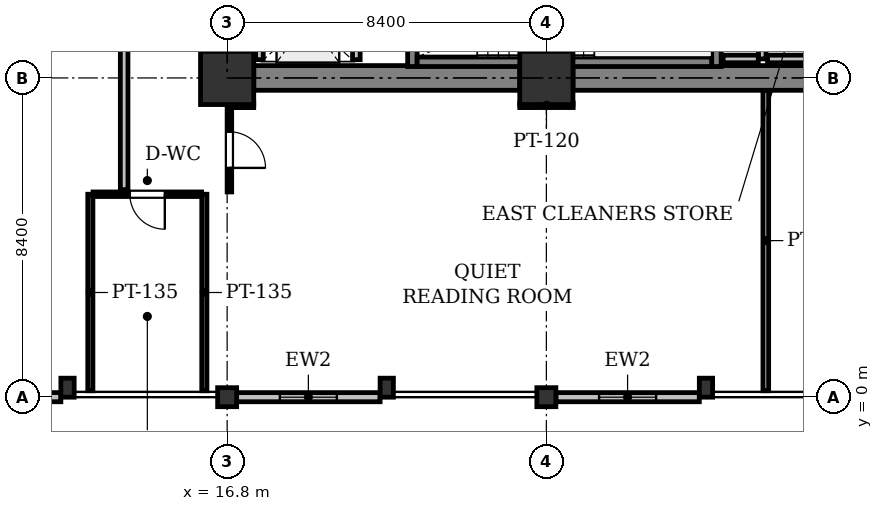
"""IFC4 building model, lengths in metres.
Left out: names, types, materials, properties, quantities, classifications, styles, units other than length and angle.
Written with IfcOpenShell. Run it as: python <this file> out.ifc"""

import sys

from ifc_helpers import new_model, si_unit, direction, frame, frame_2d, origin, origin_2d, place, context, subcontext, project, spatial, rectangle, i_section, extrude, element, fill, save


model = new_model("IFC4")
c1 = context("Model", 3, precision=1e-05, world=origin(), true_north=direction((0.0, 1.0)))
c2 = subcontext(c1, "Body", "Model", "MODEL_VIEW")
j1 = project(units=[si_unit("LENGTHUNIT", "METRE"), si_unit("PLANEANGLEUNIT", "RADIAN")], contexts=[c1])
p1 = place(None, origin())
s1 = spatial("IfcSite", under=j1, at=p1, CompositionType="ELEMENT")
p2 = place(p1, origin())
s2 = spatial("IfcBuilding", under=s1, at=p2, CompositionType="ELEMENT")
p3 = place(p2, frame((0.0, 0.0, 50.0)))
s3 = spatial("IfcBuildingStorey", under=s2, at=p3, CompositionType="ELEMENT", Elevation=50.0)
p4 = place(p3, frame((16.8, 0.0, 0.0), z_axis=(0.0, 0.0, 1.0), x_axis=(1.0, 0.0, 0.0)))
e1 = element("IfcColumn", 1, at=p4, inside=s3, PredefinedType="COLUMN", context=c2, shape_type="SweptSolid", body=[
    extrude(i_section(OverallWidth=0.5, OverallDepth=0.5, WebThickness=0.028, FlangeThickness=0.04, at=origin_2d()), origin(), (0.0, 0.0, 1.0), 4.2),
])
p5 = place(p3, frame((16.8, 8.4, 0.0), z_axis=(0.0, 0.0, 1.0), x_axis=(1.0, 0.0, 0.0)))
e2 = element("IfcColumn", 2, at=p5, inside=s3, PredefinedType="COLUMN", context=c2, shape_type="SweptSolid", body=[
    extrude(rectangle(XDim=1.4, YDim=1.4, at=origin_2d()), origin(), (0.0, 0.0, 1.0), 4.2),
])
p6 = place(p3, frame((25.2, 0.0, 0.0), z_axis=(0.0, 0.0, 1.0), x_axis=(1.0, 0.0, 0.0)))
e3 = element("IfcColumn", 3, at=p6, inside=s3, PredefinedType="COLUMN", context=c2, shape_type="SweptSolid", body=[
    extrude(i_section(OverallWidth=0.5, OverallDepth=0.5, WebThickness=0.028, FlangeThickness=0.04, at=origin_2d()), origin(), (0.0, 0.0, 1.0), 4.2),
])
p7 = place(p3, frame((25.2, 8.4, 0.0), z_axis=(0.0, 0.0, 1.0), x_axis=(1.0, 0.0, 0.0)))
e4 = element("IfcColumn", 4, at=p7, inside=s3, PredefinedType="COLUMN", context=c2, shape_type="SweptSolid", body=[
    extrude(rectangle(XDim=1.4, YDim=1.4, at=origin_2d()), origin(), (0.0, 0.0, 1.0), 4.2),
])
for number, where, z_axis, x_axis in (
    (5, (12.6, 0.25, 0.0), (0.0, 0.0, 1.0), (1.0, 0.0, 0.0)),
    (6, (21.0, 0.25, 0.0), (0.0, 0.0, 1.0), (1.0, 0.0, 0.0)),
    (7, (29.4, 0.25, 0.0), (0.0, 0.0, 1.0), (1.0, 0.0, 0.0)),
):
    element("IfcColumn", number, at=place(p3, frame(where, z_axis=z_axis, x_axis=x_axis)), inside=s3, PredefinedType="PILASTER", context=c2, shape_type="SweptSolid", body=[
        extrude(rectangle(XDim=0.35, YDim=0.5, at=origin_2d()), origin(), (0.0, 0.0, 1.0), 4.2),
    ])
p8 = place(p3, frame((29.225, 0.0, 0.0), z_axis=(0.0, 0.0, 1.0), x_axis=(-1.0, 0.0, 0.0)))
e8 = element("IfcWall", 8, at=p8, inside=s3, PredefinedType="STANDARD", context=c2, shape_type="SweptSolid", body=[
    extrude(rectangle(XDim=3.775, YDim=0.24, at=frame_2d((1.888, 0.0))), origin(), (0.0, 0.0, 1.0), 3.471),
])
p9 = place(p8, frame((1.137, 0.0, 0.9)))
e9 = element("IfcOpeningElement", 9, at=p9, cuts=e8, PredefinedType="OPENING", context=c2, shape_type="SweptSolid", body=[
    extrude(rectangle(XDim=1.5, YDim=1.6, at=frame_2d((0.75, 0.8))), frame((0.0, 0.13, 0.0), z_axis=(0.0, -1.0, 0.0), x_axis=(1.0, 0.0, 0.0)), (0.0, 0.0, 1.0), 0.26),
])
p10 = place(p3, frame((20.825, 0.0, 0.0), z_axis=(0.0, 0.0, 1.0), x_axis=(-1.0, 0.0, 0.0)))
e10 = element("IfcWall", 10, at=p10, inside=s3, PredefinedType="STANDARD", context=c2, shape_type="SweptSolid", body=[
    extrude(rectangle(XDim=3.775, YDim=0.24, at=frame_2d((1.887, 0.0))), origin(), (0.0, 0.0, 1.0), 3.471),
])
p11 = place(p10, frame((1.137, 0.0, 0.9)))
e11 = element("IfcOpeningElement", 11, at=p11, cuts=e10, PredefinedType="OPENING", context=c2, shape_type="SweptSolid", body=[
    extrude(rectangle(XDim=1.5, YDim=1.6, at=frame_2d((0.75, 0.8))), frame((0.0, 0.13, 0.0), z_axis=(0.0, -1.0, 0.0), x_axis=(1.0, 0.0, 0.0)), (0.0, 0.0, 1.0), 0.26),
])
p12 = place(p3, frame((12.425, 0.0, 0.0), z_axis=(0.0, 0.0, 1.0), x_axis=(-1.0, 0.0, 0.0)))
e12 = element("IfcWall", 12, at=p12, inside=s3, PredefinedType="STANDARD", context=c2, shape_type="SweptSolid", body=[
    extrude(rectangle(XDim=3.775, YDim=0.24, at=frame_2d((1.888, 0.0))), origin(), (0.0, 0.0, 1.0), 3.471),
])
p13 = place(p12, frame((1.137, 0.0, 0.9)))
e13 = element("IfcOpeningElement", 13, at=p13, cuts=e12, PredefinedType="OPENING", context=c2, shape_type="SweptSolid", body=[
    extrude(rectangle(XDim=1.5, YDim=1.6, at=frame_2d((0.75, 0.8))), frame((0.0, 0.13, 0.0), z_axis=(0.0, -1.0, 0.0), x_axis=(1.0, 0.0, 0.0)), (0.0, 0.0, 1.0), 0.26),
])
for number, where, z_axis, x_axis in (
    (14, (17.5, 8.4, 0.0), (0.0, 0.0, 1.0), (1.0, 0.0, 0.0)),
    (15, (25.9, 8.4, 0.0), (0.0, 0.0, 1.0), (1.0, 0.0, 0.0)),
):
    element("IfcWall", number, at=place(p3, frame(where, z_axis=z_axis, x_axis=x_axis)), inside=s3, PredefinedType="SHEAR", context=c2, shape_type="SweptSolid", body=[
        extrude(rectangle(XDim=7.0, YDim=0.65, at=frame_2d((3.5, 0.0))), origin(), (0.0, 0.0, 1.0), 3.925),
    ])
for number, where, z_axis, x_axis in (
    (16, (21.675, 8.7, 0.0), (0.0, 0.0, 1.0), (0.0, 1.0, 0.0)),
    (17, (29.675, 8.7, 0.0), (0.0, 0.0, 1.0), (0.0, 1.0, 0.0)),
):
    element("IfcWall", number, at=place(p3, frame(where, z_axis=z_axis, x_axis=x_axis)), inside=s3, PredefinedType="SHEAR", context=c2, shape_type="SweptSolid", body=[
        extrude(rectangle(XDim=3.75, YDim=0.25, at=frame_2d((1.875, 0.0))), origin(), (0.0, 0.0, 1.0), 3.925),
    ])
p14 = place(p3, frame((21.8, 8.825, 0.0), z_axis=(0.0, 0.0, 1.0), x_axis=(1.0, 0.0, 0.0)))
e18 = element("IfcWall", 18, at=p14, inside=s3, PredefinedType="SHEAR", context=c2, shape_type="SweptSolid", body=[
    extrude(rectangle(XDim=7.75, YDim=0.25, at=frame_2d((3.875, 0.0))), origin(), (0.0, 0.0, 1.0), 3.925),
])
for number, where, z_axis, x_axis in (
    (19, (20.2, 8.88, 0.0), (0.0, 0.0, 1.0), (0.0, 1.0, 0.0)),
    (20, (17.65, 8.88, 0.0), (0.0, 0.0, 1.0), (0.0, 1.0, 0.0)),
):
    element("IfcWall", number, at=place(p3, frame(where, z_axis=z_axis, x_axis=x_axis)), inside=s3, PredefinedType="PARTITIONING", context=c2, shape_type="SweptSolid", body=[
        extrude(rectangle(XDim=2.1, YDim=0.2, at=frame_2d((1.05, 0.0))), origin(), (0.0, 0.0, 1.0), 3.925),
    ])
p15 = place(p3, frame((30.88, 8.9, 0.0), z_axis=(0.0, 0.0, 1.0), x_axis=(0.0, 1.0, 0.0)))
e21 = element("IfcWall", 21, at=p15, inside=s3, PredefinedType="PARTITIONING", context=c2, shape_type="SweptSolid", body=[
    extrude(rectangle(XDim=3.43, YDim=0.2, at=frame_2d((1.715, 0.0))), origin(), (0.0, 0.0, 1.0), 3.925),
])
p16 = place(p15, frame((1.29, 0.0, 0.0)))
e22 = element("IfcOpeningElement", 22, at=p16, cuts=e21, PredefinedType="OPENING", context=c2, shape_type="SweptSolid", body=[
    extrude(rectangle(XDim=0.85, YDim=2.15, at=frame_2d((0.425, 1.075))), frame((0.0, 0.11, 0.0), z_axis=(0.0, -1.0, 0.0), x_axis=(1.0, 0.0, 0.0)), (0.0, 0.0, 1.0), 0.22),
])
p17 = place(p3, frame((29.85, 8.9, 0.0), z_axis=(0.0, 0.0, 1.0), x_axis=(1.0, 0.0, 0.0)))
e23 = element("IfcWall", 23, at=p17, inside=s3, PredefinedType="PARTITIONING", context=c2, shape_type="SweptSolid", body=[
    extrude(rectangle(XDim=0.926, YDim=0.2, at=frame_2d((0.463, 0.0))), origin(), (0.0, 0.0, 1.0), 3.925),
])
p18 = place(p3, frame((31.02, 8.9, 0.0), z_axis=(0.0, 0.0, 1.0), x_axis=(1.0, 0.0, 0.0)))
e24 = element("IfcWall", 24, at=p18, inside=s3, PredefinedType="PARTITIONING", context=c2, shape_type="SweptSolid", body=[
    extrude(rectangle(XDim=1.126, YDim=0.2, at=frame_2d((0.563, 0.0))), origin(), (0.0, 0.0, 1.0), 3.925),
])
for number, where, z_axis, x_axis in (
    (25, (13.2, 5.34, 0.0), (0.0, 0.0, 1.0), (0.0, -1.0, 0.0)),
    (26, (16.2, 0.169, 0.0), (0.0, 0.0, 1.0), (0.0, 1.0, 0.0)),
):
    element("IfcWall", number, at=place(p3, frame(where, z_axis=z_axis, x_axis=x_axis)), inside=s3, PredefinedType="PARTITIONING", context=c2, shape_type="SweptSolid", body=[
        extrude(rectangle(XDim=5.171, YDim=0.135, at=frame_2d((2.585, 0.0))), origin(), (0.0, 0.0, 1.0), 3.925),
    ])
p19 = place(p3, frame((16.128, 5.34, 0.0), z_axis=(0.0, 0.0, 1.0), x_axis=(-1.0, 0.0, 0.0)))
e27 = element("IfcWall", 27, at=p19, inside=s3, PredefinedType="PARTITIONING", context=c2, shape_type="SweptSolid", body=[
    extrude(rectangle(XDim=2.857, YDim=0.12, at=frame_2d((1.428, 0.0))), origin(), (0.0, 0.0, 1.0), 3.925),
])
p20 = place(p19, frame((0.969, 0.0, 0.0)))
e28 = element("IfcOpeningElement", 28, at=p20, cuts=e27, PredefinedType="OPENING", context=c2, shape_type="SweptSolid", body=[
    extrude(rectangle(XDim=0.92, YDim=2.1, at=frame_2d((0.46, 1.05))), frame((0.0, 0.07, 0.0), z_axis=(0.0, -1.0, 0.0), x_axis=(1.0, 0.0, 0.0)), (0.0, 0.0, 1.0), 0.14),
])
p21 = place(p3, frame((30.975, 0.169, 0.0), z_axis=(0.0, 0.0, 1.0), x_axis=(0.0, 1.0, 0.0)))
e29 = element("IfcWall", 29, at=p21, inside=s3, PredefinedType="PARTITIONING", context=c2, shape_type="SweptSolid", body=[
    extrude(rectangle(XDim=7.902, YDim=0.15, at=frame_2d((3.951, 0.0))), origin(), (0.0, 0.0, 1.0), 3.925),
])
p22 = place(p3, frame((25.906, 7.681, 0.0), z_axis=(0.0, 0.0, 1.0), x_axis=(-0.999999758706, -0.000694685487, 0.0)))
e30 = element("IfcWall", 30, at=p22, inside=s3, PredefinedType="PARTITIONING", context=c2, shape_type="SweptSolid", body=[
    extrude(rectangle(XDim=1.406, YDim=0.12, at=frame_2d((0.703, 0.0))), origin(), (0.0, 0.0, 1.0), 3.323),
])
p23 = place(p3, frame((17.5, 7.68, 0.0), z_axis=(0.0, 0.0, 1.0), x_axis=(-1.0, 0.0, 0.0)))
e31 = element("IfcWall", 31, at=p23, inside=s3, PredefinedType="PARTITIONING", context=c2, shape_type="SweptSolid", body=[
    extrude(rectangle(XDim=0.64, YDim=0.12, at=frame_2d((0.32, 0.0))), origin(), (0.0, 0.0, 1.0), 3.323),
])
p24 = place(p3, frame((16.86, 7.616, 0.0), z_axis=(0.0, 0.0, 1.0), x_axis=(0.0, -1.0, 0.0)))
e32 = element("IfcWall", 32, at=p24, inside=s3, PredefinedType="PARTITIONING", context=c2, shape_type="SweptSolid", body=[
    extrude(rectangle(XDim=2.216, YDim=0.12, at=frame_2d((1.108, 0.0))), origin(), (0.0, 0.0, 1.0), 3.323),
])
p25 = place(p24, frame((0.633, 0.0, 0.0)))
e33 = element("IfcOpeningElement", 33, at=p25, cuts=e32, PredefinedType="OPENING", context=c2, shape_type="SweptSolid", body=[
    extrude(rectangle(XDim=0.95, YDim=2.15, at=frame_2d((0.475, 1.075))), frame((0.0, 0.07, 0.0), z_axis=(0.0, -1.0, 0.0), x_axis=(1.0, 0.0, 0.0)), (0.0, 0.0, 1.0), 0.14),
])
p26 = place(p3, frame((14.09, 5.46, 0.0), z_axis=(0.0, 0.0, 1.0), x_axis=(0.0, 1.0, 0.0)))
e34 = element("IfcWall", 34, at=p26, inside=s3, PredefinedType="PARTITIONING", context=c2, shape_type="SweptSolid", body=[
    extrude(rectangle(XDim=12.08, YDim=0.2, at=frame_2d((6.04, 0.0))), origin(), (0.0, 0.0, 1.0), 3.313),
])
p27 = place(p9, origin())
e35 = element("IfcWindow", 35, at=p27, inside=s3, PartitioningType="SINGLE_PANEL", PredefinedType="WINDOW", context=c2, shape_type="SweptSolid", body=[
    extrude(rectangle(XDim=1.5, YDim=1.6, at=frame_2d((0.75, 0.8))), frame((0.0, 0.03, 0.0), z_axis=(0.0, -1.0, 0.0), x_axis=(1.0, 0.0, 0.0)), (0.0, 0.0, 1.0), 0.06),
])
fill(e9, e35)
p28 = place(p11, origin())
e36 = element("IfcWindow", 36, at=p28, inside=s3, PartitioningType="SINGLE_PANEL", PredefinedType="WINDOW", context=c2, shape_type="SweptSolid", body=[
    extrude(rectangle(XDim=1.5, YDim=1.6, at=frame_2d((0.75, 0.8))), frame((0.0, 0.03, 0.0), z_axis=(0.0, -1.0, 0.0), x_axis=(1.0, 0.0, 0.0)), (0.0, 0.0, 1.0), 0.06),
])
fill(e11, e36)
p29 = place(p20, origin())
e37 = element("IfcDoor", 37, at=p29, inside=s3, OperationType="SINGLE_SWING_LEFT", PredefinedType="DOOR", context=c2, shape_type="SweptSolid", body=[
    extrude(rectangle(XDim=0.92, YDim=2.1, at=frame_2d((0.46, 1.05))), frame((0.0, 0.025, 0.0), z_axis=(0.0, -1.0, 0.0), x_axis=(1.0, 0.0, 0.0)), (0.0, 0.0, 1.0), 0.05),
])
fill(e28, e37)
p30 = place(p25, origin())
e38 = element("IfcDoor", 38, at=p30, inside=s3, OperationType="SINGLE_SWING_RIGHT", PredefinedType="DOOR", context=c2, shape_type="SweptSolid", body=[
    extrude(rectangle(XDim=0.95, YDim=2.15, at=frame_2d((0.475, 1.075))), frame((0.0, 0.025, 0.0), z_axis=(0.0, -1.0, 0.0), x_axis=(1.0, 0.0, 0.0)), (0.0, 0.0, 1.0), 0.05),
])
fill(e33, e38)
save(model, sys.argv[1])
